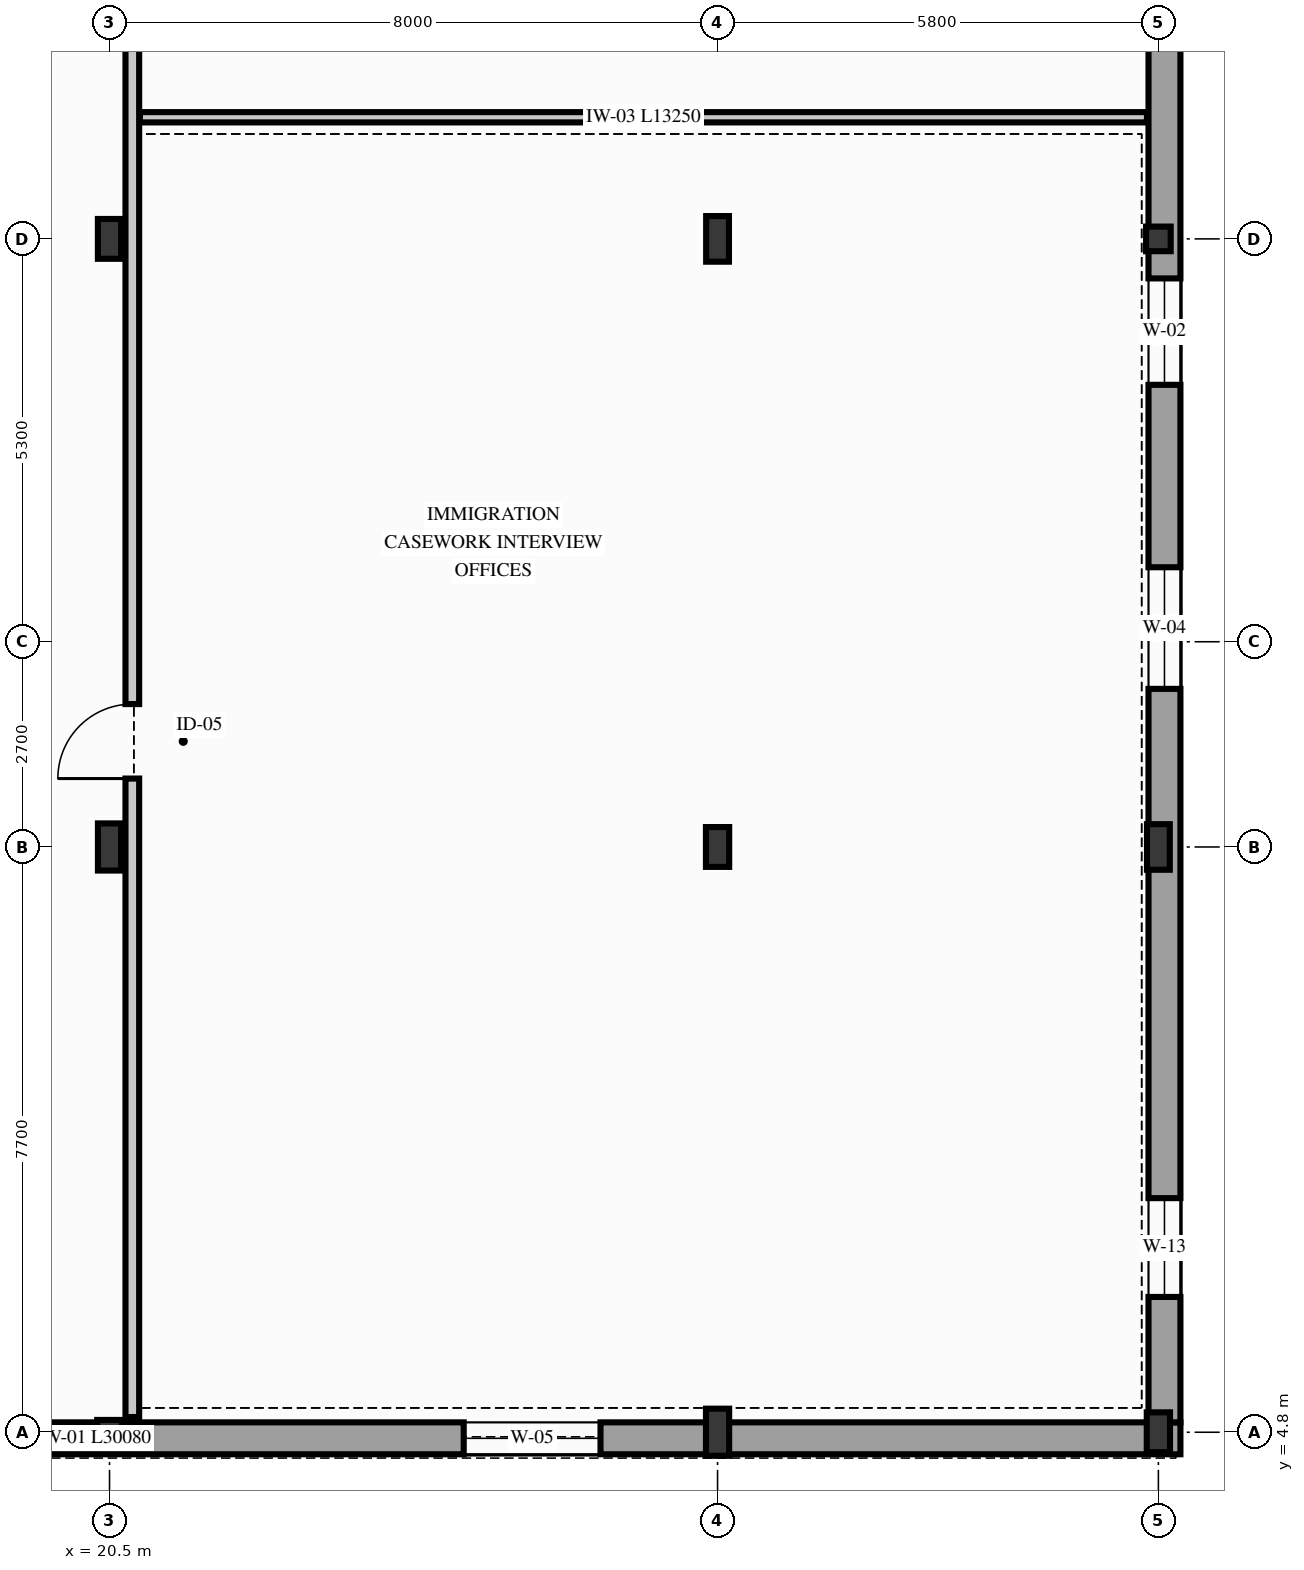
"""IFC4 building model, lengths in metres.
Left out: names, types, materials, properties, quantities, classifications, styles, units other than length and angle.
Written with IfcOpenShell. Run it as: python <this file> out.ifc"""

import sys

from ifc_helpers import new_model, si_unit, direction, frame, frame_2d, origin, origin_2d, place, context, subcontext, project, spatial, rectangle, hollow_circle, i_section, extrude, element, fill, save


model = new_model("IFC4")
c1 = context("Model", 3, precision=1e-05, world=origin(), true_north=direction((0.0, 1.0)))
c2 = subcontext(c1, "Body", "Model", "MODEL_VIEW")
j1 = project(units=[si_unit("LENGTHUNIT", "METRE"), si_unit("PLANEANGLEUNIT", "RADIAN")], contexts=[c1])
p1 = place(None, origin())
s1 = spatial("IfcSite", under=j1, at=p1, CompositionType="ELEMENT")
p2 = place(p1, origin())
s2 = spatial("IfcBuilding", under=s1, at=p2, CompositionType="ELEMENT")
p3 = place(p2, frame((0.0, 0.0, 5.1)))
s3 = spatial("IfcBuildingStorey", under=s2, at=p3, CompositionType="ELEMENT", Elevation=5.1)
p4 = place(p3, frame((20.5, 4.8, 0.0), z_axis=(0.0, 0.0, 1.0), x_axis=(1.0, 0.0, 0.0)))
e1 = element("IfcColumn", 1, at=p4, inside=s3, PredefinedType="COLUMN", context=c2, shape_type="SweptSolid", body=[
    extrude(hollow_circle(Radius=0.162, WallThickness=0.016, at=origin_2d()), origin(), (0.0, 0.0, 1.0), 4.2),
])
p5 = place(p3, frame((20.5, 12.5, 0.0), z_axis=(0.0, 0.0, 1.0), x_axis=(1.0, 0.0, 0.0)))
e2 = element("IfcColumn", 2, at=p5, inside=s3, PredefinedType="COLUMN", context=c2, shape_type="SweptSolid", body=[
    extrude(i_section(OverallWidth=0.305, OverallDepth=0.62, WebThickness=0.021, FlangeThickness=0.04, FilletRadius=0.027, at=origin_2d()), origin(), (0.0, 0.0, 1.0), 4.2),
])
p6 = place(p3, frame((20.5, 20.5, 0.0), z_axis=(0.0, 0.0, 1.0), x_axis=(1.0, 0.0, 0.0)))
e3 = element("IfcColumn", 3, at=p6, inside=s3, PredefinedType="COLUMN", context=c2, shape_type="SweptSolid", body=[
    extrude(i_section(OverallWidth=0.306, OverallDepth=0.524, WebThickness=0.021, FlangeThickness=0.04, FilletRadius=0.027, at=origin_2d()), origin(), (0.0, 0.0, 1.0), 4.2),
])
p7 = place(p3, frame((28.5, 4.8, 0.0), z_axis=(0.0, 0.0, 1.0), x_axis=(1.0, 0.0, 0.0)))
e4 = element("IfcColumn", 4, at=p7, inside=s3, PredefinedType="COLUMN", context=c2, shape_type="SweptSolid", body=[
    extrude(i_section(OverallWidth=0.305, OverallDepth=0.62, WebThickness=0.021, FlangeThickness=0.04, FilletRadius=0.027, at=origin_2d()), origin(), (0.0, 0.0, 1.0), 4.2),
])
p8 = place(p3, frame((28.5, 12.5, 0.0), z_axis=(0.0, 0.0, 1.0), x_axis=(1.0, 0.0, 0.0)))
e5 = element("IfcColumn", 5, at=p8, inside=s3, PredefinedType="COLUMN", context=c2, shape_type="SweptSolid", body=[
    extrude(i_section(OverallWidth=0.306, OverallDepth=0.524, WebThickness=0.021, FlangeThickness=0.04, FilletRadius=0.027, at=origin_2d()), origin(), (0.0, 0.0, 1.0), 4.2),
])
p9 = place(p3, frame((28.5, 20.5, 0.0), z_axis=(0.0, 0.0, 1.0), x_axis=(1.0, 0.0, 0.0)))
e6 = element("IfcColumn", 6, at=p9, inside=s3, PredefinedType="COLUMN", context=c2, shape_type="SweptSolid", body=[
    extrude(i_section(OverallWidth=0.3, OverallDepth=0.6, WebThickness=0.015, FlangeThickness=0.03, FilletRadius=0.027, at=origin_2d()), origin(), (0.0, 0.0, 1.0), 4.2),
])
p10 = place(p3, frame((34.3, 4.8, 0.0), z_axis=(0.0, 0.0, 1.0), x_axis=(1.0, 0.0, 0.0)))
e7 = element("IfcColumn", 7, at=p10, inside=s3, PredefinedType="COLUMN", context=c2, shape_type="SweptSolid", body=[
    extrude(i_section(OverallWidth=0.306, OverallDepth=0.524, WebThickness=0.021, FlangeThickness=0.04, FilletRadius=0.027, at=origin_2d()), origin(), (0.0, 0.0, 1.0), 4.2),
])
p11 = place(p3, frame((34.3, 12.5, 0.0), z_axis=(0.0, 0.0, 1.0), x_axis=(1.0, 0.0, 0.0)))
e8 = element("IfcColumn", 8, at=p11, inside=s3, PredefinedType="COLUMN", context=c2, shape_type="SweptSolid", body=[
    extrude(i_section(OverallWidth=0.3, OverallDepth=0.6, WebThickness=0.015, FlangeThickness=0.03, FilletRadius=0.027, at=origin_2d()), origin(), (0.0, 0.0, 1.0), 4.2),
])
p12 = place(p3, frame((34.3, 20.5, 0.0), z_axis=(0.0, 0.0, 1.0), x_axis=(1.0, 0.0, 0.0)))
e9 = element("IfcColumn", 9, at=p12, inside=s3, PredefinedType="COLUMN", context=c2, shape_type="SweptSolid", body=[
    extrude(hollow_circle(Radius=0.162, WallThickness=0.016, at=origin_2d()), origin(), (0.0, 0.0, 1.0), 4.2),
])
p13 = place(p3, frame((4.51, 4.72, 0.0), z_axis=(0.0, 0.0, 1.0), x_axis=(1.0, 0.0, 0.0)))
e10 = element("IfcWall", 10, at=p13, inside=s3, PredefinedType="SOLIDWALL", context=c2, shape_type="SweptSolid", body=[
    extrude(rectangle(XDim=30.08, YDim=0.42, at=frame_2d((15.04, 0.0))), origin(), (0.0, 0.0, 1.0), 3.68),
])
p14 = place(p13, frame((1.65, 0.0, 0.85)))
e11 = element("IfcOpeningElement", 11, at=p14, cuts=e10, PredefinedType="OPENING", context=c2, shape_type="SweptSolid", body=[
    extrude(rectangle(XDim=1.3, YDim=2.15, at=frame_2d((0.65, 1.075))), frame((0.0, 0.22, 0.0), z_axis=(0.0, -1.0, 0.0), x_axis=(1.0, 0.0, 0.0)), (0.0, 0.0, 1.0), 0.44),
])
p15 = place(p13, frame((5.45, 0.0, 0.84)))
e12 = element("IfcOpeningElement", 12, at=p15, cuts=e10, PredefinedType="OPENING", context=c2, shape_type="SweptSolid", body=[
    extrude(rectangle(XDim=1.5, YDim=2.3, at=frame_2d((0.75, 1.15))), frame((0.0, 0.22, 0.0), z_axis=(0.0, -1.0, 0.0), x_axis=(1.0, 0.0, 0.0)), (0.0, 0.0, 1.0), 0.44),
])
p16 = place(p13, frame((9.25, 0.0, 0.74)))
e13 = element("IfcOpeningElement", 13, at=p16, cuts=e10, PredefinedType="OPENING", context=c2, shape_type="SweptSolid", body=[
    extrude(rectangle(XDim=1.6, YDim=2.4, at=frame_2d((0.8, 1.2))), frame((0.0, 0.22, 0.0), z_axis=(0.0, -1.0, 0.0), x_axis=(1.0, 0.0, 0.0)), (0.0, 0.0, 1.0), 0.44),
])
p17 = place(p13, frame((20.65, 0.0, 0.74)))
e14 = element("IfcOpeningElement", 14, at=p17, cuts=e10, PredefinedType="OPENING", context=c2, shape_type="SweptSolid", body=[
    extrude(rectangle(XDim=1.8, YDim=2.4, at=frame_2d((0.9, 1.2))), frame((0.0, 0.22, 0.0), z_axis=(0.0, -1.0, 0.0), x_axis=(1.0, 0.0, 0.0)), (0.0, 0.0, 1.0), 0.44),
])
p18 = place(p3, frame((34.38, 4.93, 0.0), z_axis=(0.0, 0.0, 1.0), x_axis=(0.0, 1.0, 0.0)))
e15 = element("IfcWall", 15, at=p18, inside=s3, PredefinedType="SOLIDWALL", context=c2, shape_type="SweptSolid", body=[
    extrude(rectangle(XDim=31.36, YDim=0.42, at=frame_2d((15.68, 0.0))), origin(), (0.0, 0.0, 1.0), 3.68),
])
p19 = place(p18, frame((1.65, 0.0, 0.85)))
e16 = element("IfcOpeningElement", 16, at=p19, cuts=e15, PredefinedType="OPENING", context=c2, shape_type="SweptSolid", body=[
    extrude(rectangle(XDim=1.3, YDim=2.15, at=frame_2d((0.65, 1.075))), frame((0.0, 0.22, 0.0), z_axis=(0.0, -1.0, 0.0), x_axis=(1.0, 0.0, 0.0)), (0.0, 0.0, 1.0), 0.44),
])
p20 = place(p18, frame((9.65, 0.0, 0.74)))
e17 = element("IfcOpeningElement", 17, at=p20, cuts=e15, PredefinedType="OPENING", context=c2, shape_type="SweptSolid", body=[
    extrude(rectangle(XDim=1.6, YDim=2.4, at=frame_2d((0.8, 1.2))), frame((0.0, 0.22, 0.0), z_axis=(0.0, -1.0, 0.0), x_axis=(1.0, 0.0, 0.0)), (0.0, 0.0, 1.0), 0.44),
])
p21 = place(p18, frame((13.65, 0.0, 0.85)))
e18 = element("IfcOpeningElement", 18, at=p21, cuts=e15, PredefinedType="OPENING", context=c2, shape_type="SweptSolid", body=[
    extrude(rectangle(XDim=1.4, YDim=2.2, at=frame_2d((0.7, 1.1))), frame((0.0, 0.22, 0.0), z_axis=(0.0, -1.0, 0.0), x_axis=(1.0, 0.0, 0.0)), (0.0, 0.0, 1.0), 0.44),
])
p22 = place(p3, frame((20.8, 5.0, 0.0), z_axis=(0.0, 0.0, 1.0), x_axis=(0.0, 1.0, 0.0)))
e19 = element("IfcWall", 19, at=p22, inside=s3, PredefinedType="PARTITIONING", context=c2, shape_type="SweptSolid", body=[
    extrude(rectangle(XDim=31.8, YDim=0.18, at=frame_2d((15.9, 0.0))), origin(), (0.0, 0.0, 1.0), 3.678),
])
p23 = place(p22, frame((8.4, 0.0, 0.0)))
e20 = element("IfcOpeningElement", 20, at=p23, cuts=e19, PredefinedType="OPENING", context=c2, shape_type="SweptSolid", body=[
    extrude(rectangle(XDim=0.98, YDim=2.16, at=frame_2d((0.49, 1.08))), frame((0.0, 0.1, 0.0), z_axis=(0.0, -1.0, 0.0), x_axis=(1.0, 0.0, 0.0)), (0.0, 0.0, 1.0), 0.2),
])
p24 = place(p22, frame((19.5, 0.0, 0.0)))
e21 = element("IfcOpeningElement", 21, at=p24, cuts=e19, PredefinedType="OPENING", context=c2, shape_type="SweptSolid", body=[
    extrude(rectangle(XDim=0.92, YDim=2.12, at=frame_2d((0.46, 1.06))), frame((0.0, 0.1, 0.0), z_axis=(0.0, -1.0, 0.0), x_axis=(1.0, 0.0, 0.0)), (0.0, 0.0, 1.0), 0.2),
])
p25 = place(p22, frame((26.8, 0.0, 0.0)))
e22 = element("IfcOpeningElement", 22, at=p25, cuts=e19, PredefinedType="OPENING", context=c2, shape_type="SweptSolid", body=[
    extrude(rectangle(XDim=1.15, YDim=2.2, at=frame_2d((0.575, 1.1))), frame((0.0, 0.1, 0.0), z_axis=(0.0, -1.0, 0.0), x_axis=(1.0, 0.0, 0.0)), (0.0, 0.0, 1.0), 0.2),
])
p26 = place(p3, frame((20.9, 22.1, 0.0), z_axis=(0.0, 0.0, 1.0), x_axis=(1.0, 0.0, 0.0)))
e23 = element("IfcWall", 23, at=p26, inside=s3, PredefinedType="PARTITIONING", context=c2, shape_type="SweptSolid", body=[
    extrude(rectangle(XDim=13.25, YDim=0.135, at=frame_2d((6.625, 0.0))), origin(), (0.0, 0.0, 1.0), 3.578),
])
p27 = place(p17, origin())
e24 = element("IfcWindow", 24, at=p27, inside=s3, PartitioningType="SINGLE_PANEL", PredefinedType="WINDOW", context=c2, shape_type="SweptSolid", body=[
    extrude(rectangle(XDim=1.8, YDim=2.4, at=frame_2d((0.9, 1.2))), frame((0.0, 0.03, 0.0), z_axis=(0.0, -1.0, 0.0), x_axis=(1.0, 0.0, 0.0)), (0.0, 0.0, 1.0), 0.06),
])
fill(e14, e24)
p28 = place(p19, origin())
e25 = element("IfcWindow", 25, at=p28, inside=s3, PartitioningType="SINGLE_PANEL", PredefinedType="WINDOW", context=c2, shape_type="SweptSolid", body=[
    extrude(rectangle(XDim=1.3, YDim=2.15, at=frame_2d((0.65, 1.075))), frame((0.0, 0.03, 0.0), z_axis=(0.0, -1.0, 0.0), x_axis=(1.0, 0.0, 0.0)), (0.0, 0.0, 1.0), 0.06),
])
fill(e16, e25)
p29 = place(p20, origin())
e26 = element("IfcWindow", 26, at=p29, inside=s3, PartitioningType="SINGLE_PANEL", PredefinedType="WINDOW", context=c2, shape_type="SweptSolid", body=[
    extrude(rectangle(XDim=1.6, YDim=2.4, at=frame_2d((0.8, 1.2))), frame((0.0, 0.03, 0.0), z_axis=(0.0, -1.0, 0.0), x_axis=(1.0, 0.0, 0.0)), (0.0, 0.0, 1.0), 0.06),
])
fill(e17, e26)
p30 = place(p21, origin())
e27 = element("IfcWindow", 27, at=p30, inside=s3, PartitioningType="SINGLE_PANEL", PredefinedType="WINDOW", context=c2, shape_type="SweptSolid", body=[
    extrude(rectangle(XDim=1.4, YDim=2.2, at=frame_2d((0.7, 1.1))), frame((0.0, 0.03, 0.0), z_axis=(0.0, -1.0, 0.0), x_axis=(1.0, 0.0, 0.0)), (0.0, 0.0, 1.0), 0.06),
])
fill(e18, e27)
p31 = place(p23, origin())
e28 = element("IfcDoor", 28, at=p31, inside=s3, OperationType="SINGLE_SWING_LEFT", PredefinedType="DOOR", context=c2, shape_type="SweptSolid", body=[
    extrude(rectangle(XDim=0.98, YDim=2.16, at=frame_2d((0.49, 1.08))), frame((0.0, 0.025, 0.0), z_axis=(0.0, -1.0, 0.0), x_axis=(1.0, 0.0, 0.0)), (0.0, 0.0, 1.0), 0.05),
])
fill(e20, e28)
save(model, sys.argv[1])
